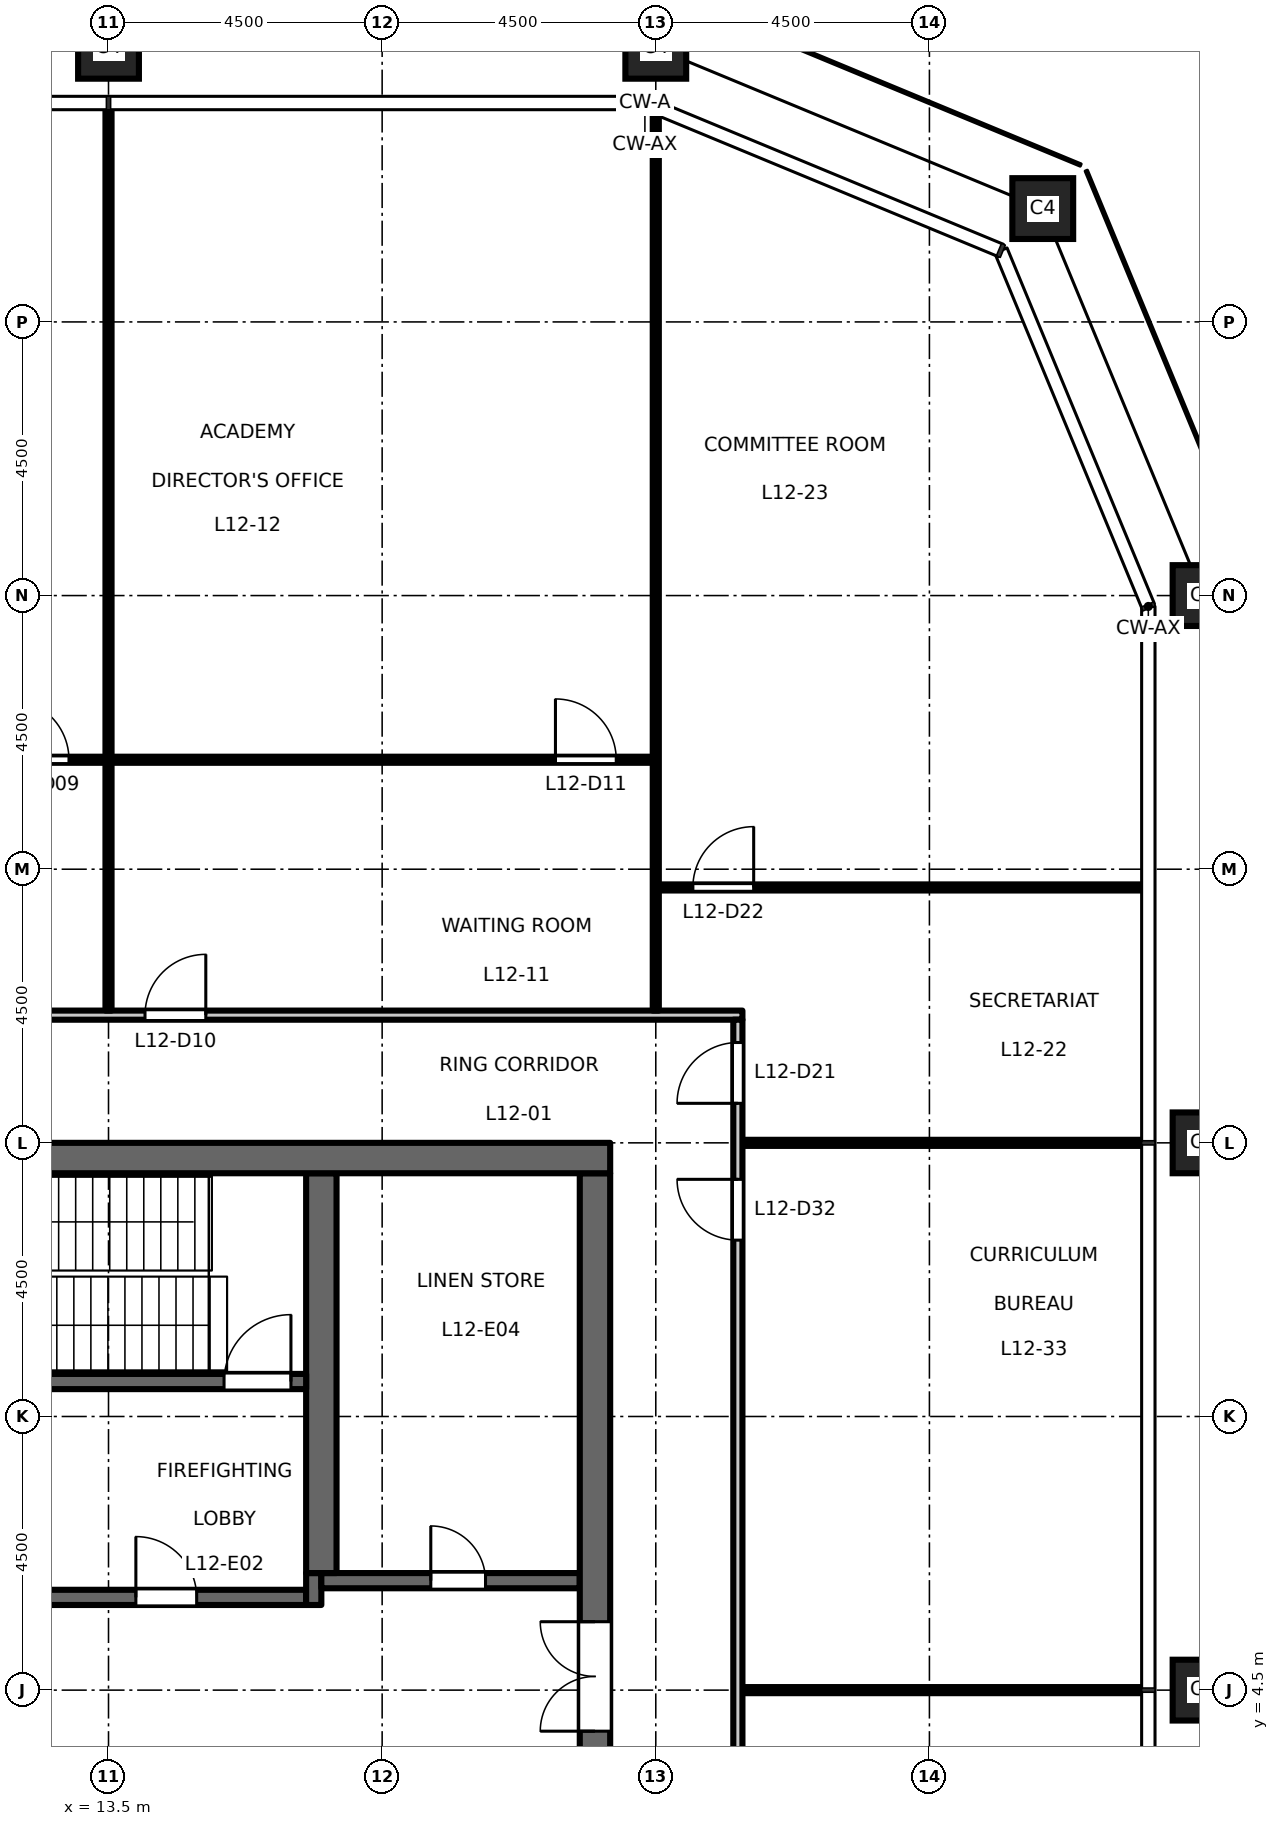
"""IFC4 building model, lengths in metres.
Left out: names, types, materials, properties, quantities, classifications, styles, units other than length and angle.
Written with IfcOpenShell. Run it as: python <this file> out.ifc"""

import sys

from ifc_helpers import new_model, si_unit, direction, frame, frame_2d, origin, origin_2d, place, context, subcontext, project, spatial, rectangle, hollow_rectangle, extrude, element, fill, save


model = new_model("IFC4")
c1 = context("Model", 3, precision=1e-05, world=origin(), true_north=direction((0.0, 1.0)))
c2 = subcontext(c1, "Body", "Model", "MODEL_VIEW")
j1 = project(units=[si_unit("LENGTHUNIT", "METRE"), si_unit("PLANEANGLEUNIT", "RADIAN")], contexts=[c1])
p1 = place(None, origin())
s1 = spatial("IfcSite", under=j1, at=p1, CompositionType="ELEMENT")
p2 = place(p1, origin())
s2 = spatial("IfcBuilding", under=s1, at=p2, CompositionType="ELEMENT")
p3 = place(p2, frame((0.0, 0.0, 58.2)))
s3 = spatial("IfcBuildingStorey", under=s2, at=p3, CompositionType="ELEMENT", Elevation=58.2)
for number, where, z_axis, x_axis in (
    (1, (31.5, 4.5, 0.0), (0.0, 0.0, 1.0), (1.0, 0.0, 0.0)),
    (2, (31.5, 13.5, 0.0), (0.0, 0.0, 1.0), (1.0, 0.0, 0.0)),
    (3, (31.5, 22.5, 0.0), (0.0, 0.0, 1.0), (1.0, 0.0, 0.0)),
    (4, (28.864, 28.864, 0.0), (0.0, 0.0, 1.0), (1.0, 0.0, 0.0)),
    (5, (22.5, 31.5, 0.0), (0.0, 0.0, 1.0), (1.0, 0.0, 0.0)),
    (6, (13.5, 31.5, 0.0), (0.0, 0.0, 1.0), (1.0, 0.0, 0.0)),
):
    element("IfcColumn", number, at=place(p3, frame(where, z_axis=z_axis, x_axis=x_axis)), inside=s3, PredefinedType="COLUMN", context=c2, shape_type="SweptSolid", body=[
        extrude(hollow_rectangle(XDim=1.0, YDim=1.0, WallThickness=0.06, at=origin_2d()), origin(), (0.0, 0.0, 1.0), 4.5),
    ])
p4 = place(p3, frame((12.15, 6.025, 0.0), z_axis=(0.0, 0.0, 1.0), x_axis=(1.0, 0.0, 0.0)))
e7 = element("IfcWall", 7, at=p4, inside=s3, PredefinedType="SHEAR", context=c2, shape_type="SweptSolid", body=[
    extrude(rectangle(XDim=4.6, YDim=0.25, at=frame_2d((2.3, 0.0))), origin(), (0.0, 0.0, 1.0), 4.35),
])
p5 = place(p4, frame((1.8, 0.0, 0.0)))
e8 = element("IfcOpeningElement", 8, at=p5, cuts=e7, PredefinedType="OPENING", context=c2, shape_type="SweptSolid", body=[
    extrude(rectangle(XDim=1.0, YDim=2.1, at=frame_2d((0.5, 1.05))), frame((0.0, 0.135, 0.0), z_axis=(0.0, -1.0, 0.0), x_axis=(1.0, 0.0, 0.0)), (0.0, 0.0, 1.0), 0.27),
])
p6 = place(p3, frame((16.875, 5.9, 0.0), z_axis=(0.0, 0.0, 1.0), x_axis=(0.0, 1.0, 0.0)))
e9 = element("IfcWall", 9, at=p6, inside=s3, PredefinedType="SHEAR", context=c2, shape_type="SweptSolid", body=[
    extrude(rectangle(XDim=0.525, YDim=0.25, at=frame_2d((0.263, 0.0))), origin(), (0.0, 0.0, 1.0), 4.35),
])
p7 = place(p3, frame((17.0, 6.3, 0.0), z_axis=(0.0, 0.0, 1.0), x_axis=(1.0, 0.0, 0.0)))
e10 = element("IfcWall", 10, at=p7, inside=s3, PredefinedType="SHEAR", context=c2, shape_type="SweptSolid", body=[
    extrude(rectangle(XDim=4.25, YDim=0.25, at=frame_2d((2.125, 0.0))), origin(), (0.0, 0.0, 1.0), 4.35),
])
p8 = place(p7, frame((1.8, 0.0, 0.0)))
e11 = element("IfcOpeningElement", 11, at=p8, cuts=e10, PredefinedType="OPENING", context=c2, shape_type="SweptSolid", body=[
    extrude(rectangle(XDim=0.9, YDim=2.1, at=frame_2d((0.45, 1.05))), frame((0.0, 0.135, 0.0), z_axis=(0.0, -1.0, 0.0), x_axis=(1.0, 0.0, 0.0)), (0.0, 0.0, 1.0), 0.27),
])
p9 = place(p3, frame((21.5, -13.0, 0.0), z_axis=(0.0, 0.0, 1.0), x_axis=(0.0, 1.0, 0.0)))
e12 = element("IfcWall", 12, at=p9, inside=s3, PredefinedType="SHEAR", context=c2, shape_type="SweptSolid", body=[
    extrude(rectangle(XDim=26.0, YDim=0.5, at=frame_2d((13.0, 0.0))), origin(), (0.0, 0.0, 1.0), 4.35),
])
p10 = place(p9, frame((16.825, 0.0, 0.0)))
e13 = element("IfcOpeningElement", 13, at=p10, cuts=e12, PredefinedType="OPENING", context=c2, shape_type="SweptSolid", body=[
    extrude(rectangle(XDim=1.8, YDim=2.1, at=frame_2d((0.9, 1.05))), frame((0.0, 0.26, 0.0), z_axis=(0.0, -1.0, 0.0), x_axis=(1.0, 0.0, 0.0)), (0.0, 0.0, 1.0), 0.52),
])
p11 = place(p9, frame((7.375, 0.0, 0.0)))
e14 = element("IfcOpeningElement", 14, at=p11, cuts=e12, PredefinedType="OPENING", context=c2, shape_type="SweptSolid", body=[
    extrude(rectangle(XDim=1.8, YDim=2.1, at=frame_2d((0.9, 1.05))), frame((0.0, 0.26, 0.0), z_axis=(0.0, -1.0, 0.0), x_axis=(1.0, 0.0, 0.0)), (0.0, 0.0, 1.0), 0.52),
])
p12 = place(p9, frame((2.65, 0.0, 0.0)))
e15 = element("IfcOpeningElement", 15, at=p12, cuts=e12, PredefinedType="OPENING", context=c2, shape_type="SweptSolid", body=[
    extrude(rectangle(XDim=0.9, YDim=2.1, at=frame_2d((0.45, 1.05))), frame((0.0, 0.26, 0.0), z_axis=(0.0, -1.0, 0.0), x_axis=(1.0, 0.0, 0.0)), (0.0, 0.0, 1.0), 0.52),
])
p13 = place(p3, frame((17.0, 6.425, 0.0), z_axis=(0.0, 0.0, 1.0), x_axis=(0.0, 1.0, 0.0)))
e16 = element("IfcWall", 16, at=p13, inside=s3, PredefinedType="SHEAR", context=c2, shape_type="SweptSolid", body=[
    extrude(rectangle(XDim=6.575, YDim=0.5, at=frame_2d((3.288, 0.0))), origin(), (0.0, 0.0, 1.0), 4.35),
])
p14 = place(p3, frame((8.75, 9.575, 0.0), z_axis=(0.0, 0.0, 1.0), x_axis=(1.0, 0.0, 0.0)))
e17 = element("IfcWall", 17, at=p14, inside=s3, PredefinedType="SHEAR", context=c2, shape_type="SweptSolid", body=[
    extrude(rectangle(XDim=8.0, YDim=0.25, at=frame_2d((4.0, 0.0))), origin(), (0.0, 0.0, 1.0), 4.35),
])
p15 = place(p14, frame((6.65, 0.0, 0.0)))
e18 = element("IfcOpeningElement", 18, at=p15, cuts=e17, PredefinedType="OPENING", context=c2, shape_type="SweptSolid", body=[
    extrude(rectangle(XDim=1.1, YDim=2.1, at=frame_2d((0.55, 1.05))), frame((0.0, 0.135, 0.0), z_axis=(0.0, -1.0, 0.0), x_axis=(1.0, 0.0, 0.0)), (0.0, 0.0, 1.0), 0.27),
])
p16 = place(p3, frame((8.25, 13.25, 0.0), z_axis=(0.0, 0.0, 1.0), x_axis=(1.0, 0.0, 0.0)))
e19 = element("IfcWall", 19, at=p16, inside=s3, PredefinedType="SHEAR", context=c2, shape_type="SweptSolid", body=[
    extrude(rectangle(XDim=13.5, YDim=0.5, at=frame_2d((6.75, 0.0))), origin(), (0.0, 0.0, 1.0), 4.35),
])
p17 = place(p3, frame((23.925, 4.5, 0.0), z_axis=(0.0, 0.0, 1.0), x_axis=(1.0, 0.0, 0.0)))
e20 = element("IfcWall", 20, at=p17, inside=s3, PredefinedType="PARTITIONING", context=c2, shape_type="SweptSolid", body=[
    extrude(rectangle(XDim=6.585, YDim=0.1, at=frame_2d((3.292, 0.0))), origin(), (0.0, 0.0, 1.0), 4.35),
])
p18 = place(p3, frame((23.925, 13.5, 0.0), z_axis=(0.0, 0.0, 1.0), x_axis=(1.0, 0.0, 0.0)))
e21 = element("IfcWall", 21, at=p18, inside=s3, PredefinedType="PARTITIONING", context=c2, shape_type="SweptSolid", body=[
    extrude(rectangle(XDim=6.585, YDim=0.1, at=frame_2d((3.292, 0.0))), origin(), (0.0, 0.0, 1.0), 3.35),
])
p19 = place(p3, frame((-23.925, 15.6, 0.0), z_axis=(0.0, 0.0, 1.0), x_axis=(1.0, 0.0, 0.0)))
e22 = element("IfcWall", 22, at=p19, inside=s3, PredefinedType="PARTITIONING", context=c2, shape_type="SweptSolid", body=[
    extrude(rectangle(XDim=47.85, YDim=0.15, at=frame_2d((23.925, 0.0))), origin(), (0.0, 0.0, 1.0), 4.35),
])
p20 = place(p19, frame((8.775, 0.0, 0.0)))
e23 = element("IfcOpeningElement", 23, at=p20, cuts=e22, PredefinedType="OPENING", context=c2, shape_type="SweptSolid", body=[
    extrude(rectangle(XDim=1.0, YDim=2.1, at=frame_2d((0.5, 1.05))), frame((0.0, 0.085, 0.0), z_axis=(0.0, -1.0, 0.0), x_axis=(1.0, 0.0, 0.0)), (0.0, 0.0, 1.0), 0.17),
])
p21 = place(p19, frame((11.025, 0.0, 0.0)))
e24 = element("IfcOpeningElement", 24, at=p21, cuts=e22, PredefinedType="OPENING", context=c2, shape_type="SweptSolid", body=[
    extrude(rectangle(XDim=1.0, YDim=2.1, at=frame_2d((0.5, 1.05))), frame((0.0, 0.085, 0.0), z_axis=(0.0, -1.0, 0.0), x_axis=(1.0, 0.0, 0.0)), (0.0, 0.0, 1.0), 0.17),
])
p22 = place(p19, frame((26.775, 0.0, 0.0)))
e25 = element("IfcOpeningElement", 25, at=p22, cuts=e22, PredefinedType="OPENING", context=c2, shape_type="SweptSolid", body=[
    extrude(rectangle(XDim=1.0, YDim=2.1, at=frame_2d((0.5, 1.05))), frame((0.0, 0.085, 0.0), z_axis=(0.0, -1.0, 0.0), x_axis=(1.0, 0.0, 0.0)), (0.0, 0.0, 1.0), 0.17),
])
p23 = place(p19, frame((29.025, 0.0, 0.0)))
e26 = element("IfcOpeningElement", 26, at=p23, cuts=e22, PredefinedType="OPENING", context=c2, shape_type="SweptSolid", body=[
    extrude(rectangle(XDim=1.0, YDim=2.1, at=frame_2d((0.5, 1.05))), frame((0.0, 0.085, 0.0), z_axis=(0.0, -1.0, 0.0), x_axis=(1.0, 0.0, 0.0)), (0.0, 0.0, 1.0), 0.17),
])
p24 = place(p19, frame((38.025, 0.0, 0.0)))
e27 = element("IfcOpeningElement", 27, at=p24, cuts=e22, PredefinedType="OPENING", context=c2, shape_type="SweptSolid", body=[
    extrude(rectangle(XDim=1.0, YDim=2.1, at=frame_2d((0.5, 1.05))), frame((0.0, 0.085, 0.0), z_axis=(0.0, -1.0, 0.0), x_axis=(1.0, 0.0, 0.0)), (0.0, 0.0, 1.0), 0.17),
])
p25 = place(p3, frame((22.55, 17.7, 0.0), z_axis=(0.0, 0.0, 1.0), x_axis=(1.0, 0.0, 0.0)))
e28 = element("IfcWall", 28, at=p25, inside=s3, PredefinedType="PARTITIONING", context=c2, shape_type="SweptSolid", body=[
    extrude(rectangle(XDim=7.96, YDim=0.1, at=frame_2d((3.98, 0.0))), origin(), (0.0, 0.0, 1.0), 4.35),
])
p26 = place(p25, frame((0.56, 0.0, 0.0)))
e29 = element("IfcOpeningElement", 29, at=p26, cuts=e28, PredefinedType="OPENING", context=c2, shape_type="SweptSolid", body=[
    extrude(rectangle(XDim=1.0, YDim=2.1, at=frame_2d((0.5, 1.05))), frame((0.0, 0.06, 0.0), z_axis=(0.0, -1.0, 0.0), x_axis=(1.0, 0.0, 0.0)), (0.0, 0.0, 1.0), 0.12),
])
p27 = place(p3, frame((-4.45, 19.8, 0.0), z_axis=(0.0, 0.0, 1.0), x_axis=(1.0, 0.0, 0.0)))
e30 = element("IfcWall", 30, at=p27, inside=s3, PredefinedType="PARTITIONING", context=c2, shape_type="SweptSolid", body=[
    extrude(rectangle(XDim=26.9, YDim=0.1, at=frame_2d((13.45, 0.0))), origin(), (0.0, 0.0, 1.0), 4.35),
])
p28 = place(p27, frame((0.55, 0.0, 0.0)))
e31 = element("IfcOpeningElement", 31, at=p28, cuts=e30, PredefinedType="OPENING", context=c2, shape_type="SweptSolid", body=[
    extrude(rectangle(XDim=1.0, YDim=2.1, at=frame_2d((0.5, 1.05))), frame((0.0, 0.06, 0.0), z_axis=(0.0, -1.0, 0.0), x_axis=(1.0, 0.0, 0.0)), (0.0, 0.0, 1.0), 0.12),
])
p29 = place(p27, frame((16.3, 0.0, 0.0)))
e32 = element("IfcOpeningElement", 32, at=p29, cuts=e30, PredefinedType="OPENING", context=c2, shape_type="SweptSolid", body=[
    extrude(rectangle(XDim=1.0, YDim=2.1, at=frame_2d((0.5, 1.05))), frame((0.0, 0.06, 0.0), z_axis=(0.0, -1.0, 0.0), x_axis=(1.0, 0.0, 0.0)), (0.0, 0.0, 1.0), 0.12),
])
p30 = place(p27, frame((25.3, 0.0, 0.0)))
e33 = element("IfcOpeningElement", 33, at=p30, cuts=e30, PredefinedType="OPENING", context=c2, shape_type="SweptSolid", body=[
    extrude(rectangle(XDim=1.0, YDim=2.1, at=frame_2d((0.5, 1.05))), frame((0.0, 0.06, 0.0), z_axis=(0.0, -1.0, 0.0), x_axis=(1.0, 0.0, 0.0)), (0.0, 0.0, 1.0), 0.12),
])
p31 = place(p3, frame((13.5, 15.675, 0.0), z_axis=(0.0, 0.0, 1.0), x_axis=(0.0, 1.0, 0.0)))
e34 = element("IfcWall", 34, at=p31, inside=s3, PredefinedType="PARTITIONING", context=c2, shape_type="SweptSolid", body=[
    extrude(rectangle(XDim=4.075, YDim=0.1, at=frame_2d((2.038, 0.0))), origin(), (0.0, 0.0, 1.0), 3.35),
])
p32 = place(p3, frame((13.5, 19.85, 0.0), z_axis=(0.0, 0.0, 1.0), x_axis=(0.0, 1.0, 0.0)))
e35 = element("IfcWall", 35, at=p32, inside=s3, PredefinedType="PARTITIONING", context=c2, shape_type="SweptSolid", body=[
    extrude(rectangle(XDim=10.66, YDim=0.1, at=frame_2d((5.33, 0.0))), origin(), (0.0, 0.0, 1.0), 3.35),
])
p33 = place(p3, frame((22.5, 15.675, 0.0), z_axis=(0.0, 0.0, 1.0), x_axis=(0.0, 1.0, 0.0)))
e36 = element("IfcWall", 36, at=p33, inside=s3, PredefinedType="PARTITIONING", context=c2, shape_type="SweptSolid", body=[
    extrude(rectangle(XDim=14.753, YDim=0.1, at=frame_2d((7.376, 0.0))), origin(), (0.0, 0.0, 1.0), 3.35),
])
p34 = place(p3, frame((23.85, -15.525, 0.0), z_axis=(0.0, 0.0, 1.0), x_axis=(0.0, 1.0, 0.0)))
e37 = element("IfcWall", 37, at=p34, inside=s3, PredefinedType="PARTITIONING", context=c2, shape_type="SweptSolid", body=[
    extrude(rectangle(XDim=31.05, YDim=0.15, at=frame_2d((15.525, 0.0))), origin(), (0.0, 0.0, 1.0), 4.35),
])
p35 = place(p34, frame((29.675, 0.0, 0.0)))
e38 = element("IfcOpeningElement", 38, at=p35, cuts=e37, PredefinedType="OPENING", context=c2, shape_type="SweptSolid", body=[
    extrude(rectangle(XDim=1.0, YDim=2.1, at=frame_2d((0.5, 1.05))), frame((0.0, 0.085, 0.0), z_axis=(0.0, -1.0, 0.0), x_axis=(1.0, 0.0, 0.0)), (0.0, 0.0, 1.0), 0.17),
])
p36 = place(p34, frame((0.575, 0.0, 0.0)))
e39 = element("IfcOpeningElement", 39, at=p36, cuts=e37, PredefinedType="OPENING", context=c2, shape_type="SweptSolid", body=[
    extrude(rectangle(XDim=1.0, YDim=2.1, at=frame_2d((0.5, 1.05))), frame((0.0, 0.085, 0.0), z_axis=(0.0, -1.0, 0.0), x_axis=(1.0, 0.0, 0.0)), (0.0, 0.0, 1.0), 0.17),
])
p37 = place(p34, frame((9.425, 0.0, 0.0)))
e40 = element("IfcOpeningElement", 40, at=p37, cuts=e37, PredefinedType="OPENING", context=c2, shape_type="SweptSolid", body=[
    extrude(rectangle(XDim=1.0, YDim=2.1, at=frame_2d((0.5, 1.05))), frame((0.0, 0.085, 0.0), z_axis=(0.0, -1.0, 0.0), x_axis=(1.0, 0.0, 0.0)), (0.0, 0.0, 1.0), 0.17),
])
p38 = place(p34, frame((11.675, 0.0, 0.0)))
e41 = element("IfcOpeningElement", 41, at=p38, cuts=e37, PredefinedType="OPENING", context=c2, shape_type="SweptSolid", body=[
    extrude(rectangle(XDim=1.0, YDim=2.1, at=frame_2d((0.5, 1.05))), frame((0.0, 0.085, 0.0), z_axis=(0.0, -1.0, 0.0), x_axis=(1.0, 0.0, 0.0)), (0.0, 0.0, 1.0), 0.17),
])
p39 = place(p34, frame((27.425, 0.0, 0.0)))
e42 = element("IfcOpeningElement", 42, at=p39, cuts=e37, PredefinedType="OPENING", context=c2, shape_type="SweptSolid", body=[
    extrude(rectangle(XDim=1.0, YDim=2.1, at=frame_2d((0.5, 1.05))), frame((0.0, 0.085, 0.0), z_axis=(0.0, -1.0, 0.0), x_axis=(1.0, 0.0, 0.0)), (0.0, 0.0, 1.0), 0.17),
])
p40 = place(p5, origin())
e43 = element("IfcDoor", 43, at=p40, inside=s3, OperationType="SINGLE_SWING_RIGHT", PredefinedType="DOOR", context=c2, shape_type="SweptSolid", body=[
    extrude(rectangle(XDim=1.0, YDim=2.1, at=frame_2d((0.5, 1.05))), frame((0.0, 0.025, 0.0), z_axis=(0.0, -1.0, 0.0), x_axis=(1.0, 0.0, 0.0)), (0.0, 0.0, 1.0), 0.05),
])
fill(e8, e43)
p41 = place(p15, origin())
e44 = element("IfcDoor", 44, at=p41, inside=s3, OperationType="SINGLE_SWING_LEFT", PredefinedType="DOOR", context=c2, shape_type="SweptSolid", body=[
    extrude(rectangle(XDim=1.1, YDim=2.1, at=frame_2d((0.55, 1.05))), frame((0.0, 0.025, 0.0), z_axis=(0.0, -1.0, 0.0), x_axis=(1.0, 0.0, 0.0)), (0.0, 0.0, 1.0), 0.05),
])
fill(e18, e44)
p42 = place(p10, origin())
e45 = element("IfcDoor", 45, at=p42, inside=s3, OperationType="DOUBLE_DOOR_DOUBLE_SWING", PredefinedType="DOOR", context=c2, shape_type="SweptSolid", body=[
    extrude(rectangle(XDim=1.8, YDim=2.1, at=frame_2d((0.9, 1.05))), frame((0.0, 0.025, 0.0), z_axis=(0.0, -1.0, 0.0), x_axis=(1.0, 0.0, 0.0)), (0.0, 0.0, 1.0), 0.05),
])
fill(e13, e45)
p43 = place(p8, origin())
e46 = element("IfcDoor", 46, at=p43, inside=s3, OperationType="SINGLE_SWING_RIGHT", PredefinedType="DOOR", context=c2, shape_type="SweptSolid", body=[
    extrude(rectangle(XDim=0.9, YDim=2.1, at=frame_2d((0.45, 1.05))), frame((0.0, 0.025, 0.0), z_axis=(0.0, -1.0, 0.0), x_axis=(1.0, 0.0, 0.0)), (0.0, 0.0, 1.0), 0.05),
])
fill(e11, e46)
p44 = place(p29, origin())
e47 = element("IfcDoor", 47, at=p44, inside=s3, OperationType="SINGLE_SWING_LEFT", PredefinedType="DOOR", context=c2, shape_type="SweptSolid", body=[
    extrude(rectangle(XDim=1.0, YDim=2.1, at=frame_2d((0.5, 1.05))), frame((0.0, 0.025, 0.0), z_axis=(0.0, -1.0, 0.0), x_axis=(1.0, 0.0, 0.0)), (0.0, 0.0, 1.0), 0.05),
])
fill(e32, e47)
p45 = place(p24, origin())
e48 = element("IfcDoor", 48, at=p45, inside=s3, OperationType="SINGLE_SWING_RIGHT", PredefinedType="DOOR", context=c2, shape_type="SweptSolid", body=[
    extrude(rectangle(XDim=1.0, YDim=2.1, at=frame_2d((0.5, 1.05))), frame((0.0, 0.025, 0.0), z_axis=(0.0, -1.0, 0.0), x_axis=(1.0, 0.0, 0.0)), (0.0, 0.0, 1.0), 0.05),
])
fill(e27, e48)
p46 = place(p30, origin())
e49 = element("IfcDoor", 49, at=p46, inside=s3, OperationType="SINGLE_SWING_LEFT", PredefinedType="DOOR", context=c2, shape_type="SweptSolid", body=[
    extrude(rectangle(XDim=1.0, YDim=2.1, at=frame_2d((0.5, 1.05))), frame((0.0, 0.025, 0.0), z_axis=(0.0, -1.0, 0.0), x_axis=(1.0, 0.0, 0.0)), (0.0, 0.0, 1.0), 0.05),
])
fill(e33, e49)
p47 = place(p35, origin())
e50 = element("IfcDoor", 50, at=p47, inside=s3, OperationType="SINGLE_SWING_LEFT", PredefinedType="DOOR", context=c2, shape_type="SweptSolid", body=[
    extrude(rectangle(XDim=1.0, YDim=2.1, at=frame_2d((0.5, 1.05))), frame((0.0, 0.025, 0.0), z_axis=(0.0, -1.0, 0.0), x_axis=(1.0, 0.0, 0.0)), (0.0, 0.0, 1.0), 0.05),
])
fill(e38, e50)
p48 = place(p26, origin())
e51 = element("IfcDoor", 51, at=p48, inside=s3, OperationType="SINGLE_SWING_RIGHT", PredefinedType="DOOR", context=c2, shape_type="SweptSolid", body=[
    extrude(rectangle(XDim=1.0, YDim=2.1, at=frame_2d((0.5, 1.05))), frame((0.0, 0.025, 0.0), z_axis=(0.0, -1.0, 0.0), x_axis=(1.0, 0.0, 0.0)), (0.0, 0.0, 1.0), 0.05),
])
fill(e29, e51)
p49 = place(p39, origin())
e52 = element("IfcDoor", 52, at=p49, inside=s3, OperationType="SINGLE_SWING_RIGHT", PredefinedType="DOOR", context=c2, shape_type="SweptSolid", body=[
    extrude(rectangle(XDim=1.0, YDim=2.1, at=frame_2d((0.5, 1.05))), frame((0.0, 0.025, 0.0), z_axis=(0.0, -1.0, 0.0), x_axis=(1.0, 0.0, 0.0)), (0.0, 0.0, 1.0), 0.05),
])
fill(e42, e52)
save(model, sys.argv[1])
